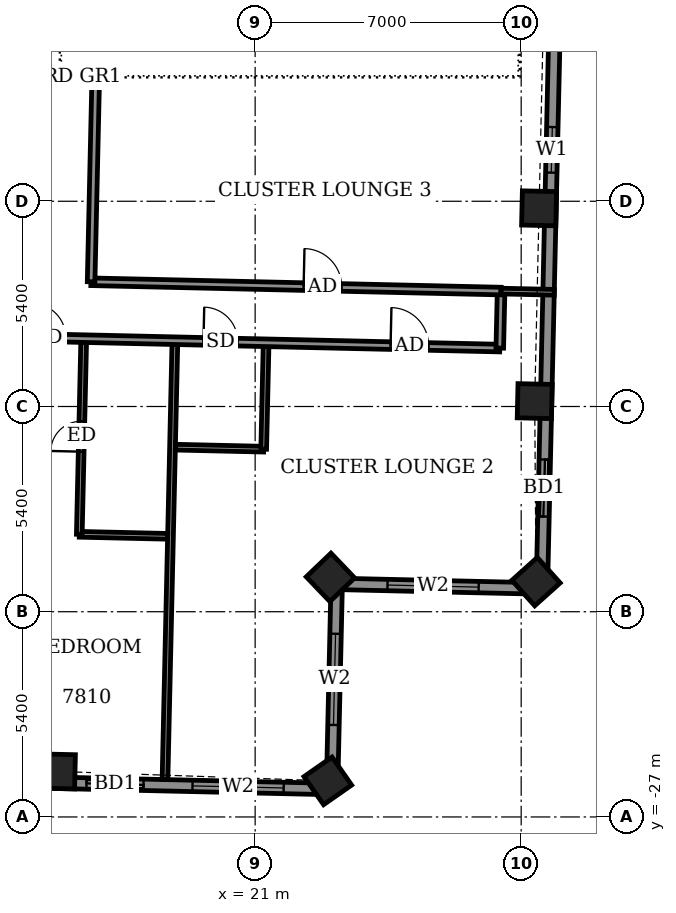
"""IFC4 building model, lengths in metres.
Left out: names, types, materials, properties, quantities, classifications, styles, units other than length and angle.
Written with IfcOpenShell. Run it as: python <this file> out.ifc"""

import sys

from ifc_helpers import new_model, si_unit, direction, frame, frame_2d, origin, origin_2d, place, context, subcontext, project, spatial, rectangle, extrude, element, fill, save


model = new_model("IFC4")
c1 = context("Model", 3, precision=1e-05, world=origin(), true_north=direction((0.0, 1.0)))
c2 = subcontext(c1, "Body", "Model", "MODEL_VIEW")
j1 = project(units=[si_unit("LENGTHUNIT", "METRE"), si_unit("PLANEANGLEUNIT", "RADIAN")], contexts=[c1])
p1 = place(None, origin())
s1 = spatial("IfcSite", under=j1, at=p1, CompositionType="ELEMENT")
p2 = place(p1, origin())
s2 = spatial("IfcBuilding", under=s1, at=p2, CompositionType="ELEMENT")
p3 = place(p2, frame((0.0, 0.0, 306.1)))
s3 = spatial("IfcBuildingStorey", under=s2, at=p3, CompositionType="ELEMENT", Elevation=306.1)
for number, where, z_axis, x_axis in (
    (1, (15.81, -25.802, -0.55), (0.0, 0.0, 1.0), (1.0, -0.023, 0.0)),
    (2, (22.912, -26.05, -0.55), (0.0, 0.0, 1.0), (0.82, 0.572, 0.0)),
    (3, (22.981, -20.696, -0.55), (0.0, 0.0, 1.0), (0.723, 0.691, 0.0)),
    (4, (28.39, -20.808, -0.55), (0.0, 0.0, 1.0), (0.744, 0.668, 0.0)),
    (5, (28.356, -16.059, -0.55), (0.0, 0.0, 1.0), (0.023, 1.0, 0.0)),
    (6, (28.471, -10.986, -0.55), (0.0, 0.0, 1.0), (0.023, 1.0, 0.0)),
):
    element("IfcColumn", number, at=place(p3, frame(where, z_axis=z_axis, x_axis=x_axis)), inside=s3, PredefinedType="COLUMN", context=c2, shape_type="SweptSolid", body=[
        extrude(rectangle(XDim=0.9, YDim=0.9, at=origin_2d()), origin(), (0.0, 0.0, 1.0), 3.6),
    ])
p4 = place(p3, frame((28.544, -20.99, 0.0), z_axis=(0.0, 0.0, 1.0), x_axis=(0.022676396018, 0.999742857471, 0.0)))
e7 = element("IfcWall", 7, at=p4, inside=s3, PredefinedType="SOLIDWALL", context=c2, shape_type="SweptSolid", body=[
    extrude(rectangle(XDim=15.525, YDim=0.3, at=frame_2d((7.762, 0.0))), origin(), (0.0, 0.0, 1.0), 2.55),
])
p5 = place(p4, frame((1.895, 0.0, 0.0)))
e8 = element("IfcOpeningElement", 8, at=p5, cuts=e7, PredefinedType="OPENING", context=c2, shape_type="SweptSolid", body=[
    extrude(rectangle(XDim=1.5, YDim=2.4, at=frame_2d((0.75, 1.2))), frame((0.0, 0.16, 0.0), z_axis=(0.0, -1.0, 0.0), x_axis=(1.0, 0.0, 0.0)), (0.0, 0.0, 1.0), 0.32),
])
p6 = place(p4, frame((10.946, 0.0, 0.9)))
e9 = element("IfcOpeningElement", 9, at=p6, cuts=e7, PredefinedType="OPENING", context=c2, shape_type="SweptSolid", body=[
    extrude(rectangle(XDim=1.2, YDim=1.5, at=frame_2d((0.6, 0.75))), frame((0.0, 0.16, 0.0), z_axis=(0.0, -1.0, 0.0), x_axis=(1.0, 0.0, 0.0)), (0.0, 0.0, 1.0), 0.32),
])
p7 = place(p3, frame((-28.264, -25.102, 0.0), z_axis=(0.0, 0.0, 1.0), x_axis=(0.999742520573, -0.022691244094, 0.0)))
e10 = element("IfcWall", 10, at=p7, inside=s3, PredefinedType="SOLIDWALL", context=c2, shape_type="SweptSolid", body=[
    extrude(rectangle(XDim=51.3, YDim=0.3, at=frame_2d((25.65, 0.0))), origin(), (0.0, 0.0, 1.0), 2.5),
])
p8 = place(p7, frame((1.654, 0.0, 0.0)))
e11 = element("IfcOpeningElement", 11, at=p8, cuts=e10, PredefinedType="OPENING", context=c2, shape_type="SweptSolid", body=[
    extrude(rectangle(XDim=1.5, YDim=2.4, at=frame_2d((0.75, 1.2))), frame((0.0, 0.16, 0.0), z_axis=(0.0, -1.0, 0.0), x_axis=(1.0, 0.0, 0.0)), (0.0, 0.0, 1.0), 0.32),
])
p9 = place(p7, frame((4.936, 0.0, 0.0)))
e12 = element("IfcOpeningElement", 12, at=p9, cuts=e10, PredefinedType="OPENING", context=c2, shape_type="SweptSolid", body=[
    extrude(rectangle(XDim=1.5, YDim=2.4, at=frame_2d((0.75, 1.2))), frame((0.0, 0.16, 0.0), z_axis=(0.0, -1.0, 0.0), x_axis=(1.0, 0.0, 0.0)), (0.0, 0.0, 1.0), 0.32),
])
p10 = place(p7, frame((9.975, 0.0, 0.0)))
e13 = element("IfcOpeningElement", 13, at=p10, cuts=e10, PredefinedType="OPENING", context=c2, shape_type="SweptSolid", body=[
    extrude(rectangle(XDim=1.5, YDim=2.4, at=frame_2d((0.75, 1.2))), frame((0.0, 0.16, 0.0), z_axis=(0.0, -1.0, 0.0), x_axis=(1.0, 0.0, 0.0)), (0.0, 0.0, 1.0), 0.32),
])
p11 = place(p7, frame((15.196, 0.0, 0.0)))
e14 = element("IfcOpeningElement", 14, at=p11, cuts=e10, PredefinedType="OPENING", context=c2, shape_type="SweptSolid", body=[
    extrude(rectangle(XDim=1.5, YDim=2.4, at=frame_2d((0.75, 1.2))), frame((0.0, 0.16, 0.0), z_axis=(0.0, -1.0, 0.0), x_axis=(1.0, 0.0, 0.0)), (0.0, 0.0, 1.0), 0.32),
])
p12 = place(p7, frame((18.5, 0.0, 0.0)))
e15 = element("IfcOpeningElement", 15, at=p12, cuts=e10, PredefinedType="OPENING", context=c2, shape_type="SweptSolid", body=[
    extrude(rectangle(XDim=1.5, YDim=2.4, at=frame_2d((0.75, 1.2))), frame((0.0, 0.16, 0.0), z_axis=(0.0, -1.0, 0.0), x_axis=(1.0, 0.0, 0.0)), (0.0, 0.0, 1.0), 0.32),
])
p13 = place(p7, frame((23.157, 0.0, 0.0)))
e16 = element("IfcOpeningElement", 16, at=p13, cuts=e10, PredefinedType="OPENING", context=c2, shape_type="SweptSolid", body=[
    extrude(rectangle(XDim=1.5, YDim=2.4, at=frame_2d((0.75, 1.2))), frame((0.0, 0.16, 0.0), z_axis=(0.0, -1.0, 0.0), x_axis=(1.0, 0.0, 0.0)), (0.0, 0.0, 1.0), 0.32),
])
p14 = place(p7, frame((26.643, 0.0, 0.0)))
e17 = element("IfcOpeningElement", 17, at=p14, cuts=e10, PredefinedType="OPENING", context=c2, shape_type="SweptSolid", body=[
    extrude(rectangle(XDim=1.5, YDim=2.4, at=frame_2d((0.75, 1.2))), frame((0.0, 0.16, 0.0), z_axis=(0.0, -1.0, 0.0), x_axis=(1.0, 0.0, 0.0)), (0.0, 0.0, 1.0), 0.32),
])
p15 = place(p7, frame((31.275, 0.0, 0.0)))
e18 = element("IfcOpeningElement", 18, at=p15, cuts=e10, PredefinedType="OPENING", context=c2, shape_type="SweptSolid", body=[
    extrude(rectangle(XDim=1.5, YDim=2.4, at=frame_2d((0.75, 1.2))), frame((0.0, 0.16, 0.0), z_axis=(0.0, -1.0, 0.0), x_axis=(1.0, 0.0, 0.0)), (0.0, 0.0, 1.0), 0.32),
])
p16 = place(p7, frame((34.578, 0.0, 0.0)))
e19 = element("IfcOpeningElement", 19, at=p16, cuts=e10, PredefinedType="OPENING", context=c2, shape_type="SweptSolid", body=[
    extrude(rectangle(XDim=1.5, YDim=2.4, at=frame_2d((0.75, 1.2))), frame((0.0, 0.16, 0.0), z_axis=(0.0, -1.0, 0.0), x_axis=(1.0, 0.0, 0.0)), (0.0, 0.0, 1.0), 0.32),
])
p17 = place(p7, frame((39.75, 0.0, 0.0)))
e20 = element("IfcOpeningElement", 20, at=p17, cuts=e10, PredefinedType="OPENING", context=c2, shape_type="SweptSolid", body=[
    extrude(rectangle(XDim=1.5, YDim=2.4, at=frame_2d((0.75, 1.2))), frame((0.0, 0.16, 0.0), z_axis=(0.0, -1.0, 0.0), x_axis=(1.0, 0.0, 0.0)), (0.0, 0.0, 1.0), 0.32),
])
p18 = place(p7, frame((44.839, 0.0, 0.0)))
e21 = element("IfcOpeningElement", 21, at=p18, cuts=e10, PredefinedType="OPENING", context=c2, shape_type="SweptSolid", body=[
    extrude(rectangle(XDim=1.5, YDim=2.4, at=frame_2d((0.75, 1.2))), frame((0.0, 0.16, 0.0), z_axis=(0.0, -1.0, 0.0), x_axis=(1.0, 0.0, 0.0)), (0.0, 0.0, 1.0), 0.32),
])
p19 = place(p7, frame((47.628, 0.0, 0.9)))
e22 = element("IfcOpeningElement", 22, at=p19, cuts=e10, PredefinedType="OPENING", context=c2, shape_type="SweptSolid", body=[
    extrude(rectangle(XDim=2.4, YDim=1.5, at=frame_2d((1.2, 0.75))), frame((0.0, 0.16, 0.0), z_axis=(0.0, -1.0, 0.0), x_axis=(1.0, 0.0, 0.0)), (0.0, 0.0, 1.0), 0.32),
])
p20 = place(p3, frame((23.023, -26.266, 0.0), z_axis=(0.0, 0.0, 1.0), x_axis=(0.022784045517, 0.999740409941, 0.0)))
e23 = element("IfcWall", 23, at=p20, inside=s3, PredefinedType="SOLIDWALL", context=c2, shape_type="SweptSolid", body=[
    extrude(rectangle(XDim=5.401, YDim=0.3, at=frame_2d((2.7, 0.0))), origin(), (0.0, 0.0, 1.0), 2.55),
])
p21 = place(p20, frame((1.687, 0.0, 0.9)))
e24 = element("IfcOpeningElement", 24, at=p21, cuts=e23, PredefinedType="OPENING", context=c2, shape_type="SweptSolid", body=[
    extrude(rectangle(XDim=2.4, YDim=1.5, at=frame_2d((1.2, 0.75))), frame((0.0, 0.16, 0.0), z_axis=(0.0, -1.0, 0.0), x_axis=(1.0, 0.0, 0.0)), (0.0, 0.0, 1.0), 0.32),
])
p22 = place(p3, frame((23.146, -20.867, 0.0), z_axis=(0.0, 0.0, 1.0), x_axis=(0.999740292565, -0.022789195272, 0.0)))
e25 = element("IfcWall", 25, at=p22, inside=s3, PredefinedType="SOLIDWALL", context=c2, shape_type="SweptSolid", body=[
    extrude(rectangle(XDim=5.399, YDim=0.3, at=frame_2d((2.7, 0.0))), origin(), (0.0, 0.0, 1.0), 2.55),
])
p23 = place(p22, frame((1.337, 0.0, 0.9)))
e26 = element("IfcOpeningElement", 26, at=p23, cuts=e25, PredefinedType="OPENING", context=c2, shape_type="SweptSolid", body=[
    extrude(rectangle(XDim=2.4, YDim=1.5, at=frame_2d((1.2, 0.75))), frame((0.0, 0.16, 0.0), z_axis=(0.0, -1.0, 0.0), x_axis=(1.0, 0.0, 0.0)), (0.0, 0.0, 1.0), 0.32),
])
p24 = place(p3, frame((18.628, -26.016, 0.0), z_axis=(0.0, 0.0, 1.0), x_axis=(0.022623082162, 0.999744065325, 0.0)))
e27 = element("IfcWall", 27, at=p24, inside=s3, PredefinedType="PARTITIONING", context=c2, shape_type="SweptSolid", body=[
    extrude(rectangle(XDim=11.45, YDim=0.15, at=frame_2d((5.725, 0.0))), origin(), (0.0, 0.0, 1.0), 2.5),
])
p25 = place(p3, frame((16.373, -19.563, 0.0), z_axis=(0.0, 0.0, 1.0), x_axis=(0.999740478815, -0.022781023197, 0.0)))
e28 = element("IfcWall", 28, at=p25, inside=s3, PredefinedType="PARTITIONING", context=c2, shape_type="SweptSolid", body=[
    extrude(rectangle(XDim=2.325, YDim=0.15, at=frame_2d((1.163, 0.0))), origin(), (0.0, 0.0, 1.0), 3.05),
])
p26 = place(p3, frame((16.373, -19.563, 0.0), z_axis=(0.0, 0.0, 1.0), x_axis=(0.022773025649, 0.999740661023, 0.0)))
e29 = element("IfcWall", 29, at=p26, inside=s3, PredefinedType="PARTITIONING", context=c2, shape_type="SweptSolid", body=[
    extrude(rectangle(XDim=5.049, YDim=0.15, at=frame_2d((2.525, 0.0))), origin(), (0.0, 0.0, 1.0), 3.05),
])
p27 = place(p26, frame((2.175, 0.0, 0.0)))
e30 = element("IfcOpeningElement", 30, at=p27, cuts=e29, PredefinedType="OPENING", context=c2, shape_type="SweptSolid", body=[
    extrude(rectangle(XDim=0.8, YDim=2.1, at=frame_2d((0.4, 1.05))), frame((0.0, 0.085, 0.0), z_axis=(0.0, -1.0, 0.0), x_axis=(1.0, 0.0, 0.0)), (0.0, 0.0, 1.0), 0.17),
])
p28 = place(p3, frame((18.901, -17.27, 0.0), z_axis=(0.0, 0.0, 1.0), x_axis=(0.99974031529, -0.022788198363, 0.0)))
e31 = element("IfcWall", 31, at=p28, inside=s3, PredefinedType="PARTITIONING", context=c2, shape_type="SweptSolid", body=[
    extrude(rectangle(XDim=2.325, YDim=0.15, at=frame_2d((1.162, 0.0))), origin(), (0.0, 0.0, 1.0), 3.05),
])
p29 = place(p3, frame((21.225, -17.323, 0.0), z_axis=(0.0, 0.0, 1.0), x_axis=(0.022961663075, 0.999736346258, 0.0)))
e32 = element("IfcWall", 32, at=p29, inside=s3, PredefinedType="PARTITIONING", context=c2, shape_type="SweptSolid", body=[
    extrude(rectangle(XDim=2.701, YDim=0.15, at=frame_2d((1.35, 0.0))), origin(), (0.0, 0.0, 1.0), 3.05),
])
p30 = place(p3, frame((-31.347, -13.329, 0.0), z_axis=(0.0, 0.0, 1.0), x_axis=(0.999742613079, -0.022687168058, 0.0)))
e33 = element("IfcWall", 33, at=p30, inside=s3, PredefinedType="PARTITIONING", context=c2, shape_type="SweptSolid", body=[
    extrude(rectangle(XDim=58.799, YDim=0.2, at=frame_2d((29.399, 0.0))), origin(), (0.0, 0.0, 1.0), 3.05),
])
p31 = place(p30, frame((1.35, 0.0, 0.0)))
e34 = element("IfcOpeningElement", 34, at=p31, cuts=e33, PredefinedType="OPENING", context=c2, shape_type="SweptSolid", body=[
    extrude(rectangle(XDim=1.0, YDim=2.1, at=frame_2d((0.5, 1.05))), frame((0.0, 0.11, 0.0), z_axis=(0.0, -1.0, 0.0), x_axis=(1.0, 0.0, 0.0)), (0.0, 0.0, 1.0), 0.22),
])
p32 = place(p30, frame((5.95, 0.0, 0.0)))
e35 = element("IfcOpeningElement", 35, at=p32, cuts=e33, PredefinedType="OPENING", context=c2, shape_type="SweptSolid", body=[
    extrude(rectangle(XDim=0.9, YDim=2.1, at=frame_2d((0.45, 1.05))), frame((0.0, 0.11, 0.0), z_axis=(0.0, -1.0, 0.0), x_axis=(1.0, 0.0, 0.0)), (0.0, 0.0, 1.0), 0.22),
])
p33 = place(p30, frame((10.575, 0.0, 0.0)))
e36 = element("IfcOpeningElement", 36, at=p33, cuts=e33, PredefinedType="OPENING", context=c2, shape_type="SweptSolid", body=[
    extrude(rectangle(XDim=0.9, YDim=2.1, at=frame_2d((0.45, 1.05))), frame((0.0, 0.11, 0.0), z_axis=(0.0, -1.0, 0.0), x_axis=(1.0, 0.0, 0.0)), (0.0, 0.0, 1.0), 0.22),
])
p34 = place(p30, frame((12.425, 0.0, 0.0)))
e37 = element("IfcOpeningElement", 37, at=p34, cuts=e33, PredefinedType="OPENING", context=c2, shape_type="SweptSolid", body=[
    extrude(rectangle(XDim=0.9, YDim=2.1, at=frame_2d((0.45, 1.05))), frame((0.0, 0.11, 0.0), z_axis=(0.0, -1.0, 0.0), x_axis=(1.0, 0.0, 0.0)), (0.0, 0.0, 1.0), 0.22),
])
p35 = place(p30, frame((19.075, 0.0, 0.0)))
e38 = element("IfcOpeningElement", 38, at=p35, cuts=e33, PredefinedType="OPENING", context=c2, shape_type="SweptSolid", body=[
    extrude(rectangle(XDim=0.9, YDim=2.1, at=frame_2d((0.45, 1.05))), frame((0.0, 0.11, 0.0), z_axis=(0.0, -1.0, 0.0), x_axis=(1.0, 0.0, 0.0)), (0.0, 0.0, 1.0), 0.22),
])
p36 = place(p30, frame((20.95, 0.0, 0.0)))
e39 = element("IfcOpeningElement", 39, at=p36, cuts=e33, PredefinedType="OPENING", context=c2, shape_type="SweptSolid", body=[
    extrude(rectangle(XDim=0.9, YDim=2.1, at=frame_2d((0.45, 1.05))), frame((0.0, 0.11, 0.0), z_axis=(0.0, -1.0, 0.0), x_axis=(1.0, 0.0, 0.0)), (0.0, 0.0, 1.0), 0.22),
])
p37 = place(p30, frame((27.625, 0.0, 0.0)))
e40 = element("IfcOpeningElement", 40, at=p37, cuts=e33, PredefinedType="OPENING", context=c2, shape_type="SweptSolid", body=[
    extrude(rectangle(XDim=0.9, YDim=2.1, at=frame_2d((0.45, 1.05))), frame((0.0, 0.11, 0.0), z_axis=(0.0, -1.0, 0.0), x_axis=(1.0, 0.0, 0.0)), (0.0, 0.0, 1.0), 0.22),
])
p38 = place(p30, frame((29.475, 0.0, 0.0)))
e41 = element("IfcOpeningElement", 41, at=p38, cuts=e33, PredefinedType="OPENING", context=c2, shape_type="SweptSolid", body=[
    extrude(rectangle(XDim=0.9, YDim=2.1, at=frame_2d((0.45, 1.05))), frame((0.0, 0.11, 0.0), z_axis=(0.0, -1.0, 0.0), x_axis=(1.0, 0.0, 0.0)), (0.0, 0.0, 1.0), 0.22),
])
p39 = place(p30, frame((36.125, 0.0, 0.0)))
e42 = element("IfcOpeningElement", 42, at=p39, cuts=e33, PredefinedType="OPENING", context=c2, shape_type="SweptSolid", body=[
    extrude(rectangle(XDim=0.9, YDim=2.1, at=frame_2d((0.45, 1.05))), frame((0.0, 0.11, 0.0), z_axis=(0.0, -1.0, 0.0), x_axis=(1.0, 0.0, 0.0)), (0.0, 0.0, 1.0), 0.22),
])
p40 = place(p30, frame((37.95, 0.0, 0.0)))
e43 = element("IfcOpeningElement", 43, at=p40, cuts=e33, PredefinedType="OPENING", context=c2, shape_type="SweptSolid", body=[
    extrude(rectangle(XDim=0.9, YDim=2.1, at=frame_2d((0.45, 1.05))), frame((0.0, 0.11, 0.0), z_axis=(0.0, -1.0, 0.0), x_axis=(1.0, 0.0, 0.0)), (0.0, 0.0, 1.0), 0.22),
])
p41 = place(p30, frame((44.6, 0.0, 0.0)))
e44 = element("IfcOpeningElement", 44, at=p41, cuts=e33, PredefinedType="OPENING", context=c2, shape_type="SweptSolid", body=[
    extrude(rectangle(XDim=0.9, YDim=2.1, at=frame_2d((0.45, 1.05))), frame((0.0, 0.11, 0.0), z_axis=(0.0, -1.0, 0.0), x_axis=(1.0, 0.0, 0.0)), (0.0, 0.0, 1.0), 0.22),
])
p42 = place(p30, frame((46.475, 0.0, 0.0)))
e45 = element("IfcOpeningElement", 45, at=p42, cuts=e33, PredefinedType="OPENING", context=c2, shape_type="SweptSolid", body=[
    extrude(rectangle(XDim=0.9, YDim=2.1, at=frame_2d((0.45, 1.05))), frame((0.0, 0.11, 0.0), z_axis=(0.0, -1.0, 0.0), x_axis=(1.0, 0.0, 0.0)), (0.0, 0.0, 1.0), 0.22),
])
p43 = place(p30, frame((55.925, 0.0, 0.0)))
e46 = element("IfcOpeningElement", 46, at=p43, cuts=e33, PredefinedType="OPENING", context=c2, shape_type="SweptSolid", body=[
    extrude(rectangle(XDim=1.0, YDim=2.1, at=frame_2d((0.5, 1.05))), frame((0.0, 0.11, 0.0), z_axis=(0.0, -1.0, 0.0), x_axis=(1.0, 0.0, 0.0)), (0.0, 0.0, 1.0), 0.22),
])
p44 = place(p30, frame((51.0, 0.0, 0.0)))
e47 = element("IfcOpeningElement", 47, at=p44, cuts=e33, PredefinedType="OPENING", context=c2, shape_type="SweptSolid", body=[
    extrude(rectangle(XDim=0.9, YDim=2.1, at=frame_2d((0.45, 1.05))), frame((0.0, 0.11, 0.0), z_axis=(0.0, -1.0, 0.0), x_axis=(1.0, 0.0, 0.0)), (0.0, 0.0, 1.0), 0.22),
])
p45 = place(p3, frame((27.437, -14.663, 0.0), z_axis=(0.0, 0.0, 1.0), x_axis=(0.022617910375, 0.999744182344, 0.0)))
e48 = element("IfcWall", 48, at=p45, inside=s3, PredefinedType="PARTITIONING", context=c2, shape_type="SweptSolid", body=[
    extrude(rectangle(XDim=1.5, YDim=0.2, at=frame_2d((0.75, 0.0))), origin(), (0.0, 0.0, 1.0), 3.05),
])
p46 = place(p3, frame((16.679, -12.918, 0.0), z_axis=(0.0, 0.0, 1.0), x_axis=(0.999742162372, -0.022707020428, 0.0)))
e49 = element("IfcWall", 49, at=p46, inside=s3, PredefinedType="PARTITIONING", context=c2, shape_type="SweptSolid", body=[
    extrude(rectangle(XDim=10.795, YDim=0.2, at=frame_2d((5.397, 0.0))), origin(), (0.0, 0.0, 1.0), 3.05),
])
p47 = place(p46, frame((5.598, 0.0, 0.0)))
e50 = element("IfcOpeningElement", 50, at=p47, cuts=e49, PredefinedType="OPENING", context=c2, shape_type="SweptSolid", body=[
    extrude(rectangle(XDim=1.0, YDim=2.1, at=frame_2d((0.5, 1.05))), frame((0.0, 0.11, 0.0), z_axis=(0.0, -1.0, 0.0), x_axis=(1.0, 0.0, 0.0)), (0.0, 0.0, 1.0), 0.22),
])
p48 = place(p3, frame((16.684, -12.919, 0.0), z_axis=(0.0, 0.0, 1.0), x_axis=(0.022667483124, 0.999743059595, 0.0)))
e51 = element("IfcWall", 51, at=p48, inside=s3, PredefinedType="PARTITIONING", context=c2, shape_type="SweptSolid", body=[
    extrude(rectangle(XDim=5.245, YDim=0.2, at=frame_2d((2.623, 0.0))), origin(), (0.0, 0.0, 1.0), 3.05),
])
p49 = place(p3, frame((27.467, -13.163, 0.0), z_axis=(0.0, 0.0, 1.0), x_axis=(0.999740667531, -0.022772739949, 0.0)))
e52 = element("IfcWall", 52, at=p49, inside=s3, PredefinedType="PARTITIONING", context=c2, shape_type="SweptSolid", body=[
    extrude(rectangle(XDim=1.404, YDim=0.15, at=frame_2d((0.702, 0.0))), origin(), (0.0, 0.0, 1.0), 2.55),
])
p50 = place(p5, origin())
e53 = element("IfcDoor", 53, at=p50, inside=s3, OperationType="SLIDING_TO_LEFT", PredefinedType="DOOR", context=c2, shape_type="SweptSolid", body=[
    extrude(rectangle(XDim=1.5, YDim=2.4, at=frame_2d((0.75, 1.2))), frame((0.0, 0.025, 0.0), z_axis=(0.0, -1.0, 0.0), x_axis=(1.0, 0.0, 0.0)), (0.0, 0.0, 1.0), 0.05),
])
fill(e8, e53)
p51 = place(p6, origin())
e54 = element("IfcWindow", 54, at=p51, inside=s3, PartitioningType="SINGLE_PANEL", PredefinedType="WINDOW", context=c2, shape_type="SweptSolid", body=[
    extrude(rectangle(XDim=1.2, YDim=1.5, at=frame_2d((0.6, 0.75))), frame((0.0, 0.03, 0.0), z_axis=(0.0, -1.0, 0.0), x_axis=(1.0, 0.0, 0.0)), (0.0, 0.0, 1.0), 0.06),
])
fill(e9, e54)
p52 = place(p18, origin())
e55 = element("IfcDoor", 55, at=p52, inside=s3, OperationType="SLIDING_TO_LEFT", PredefinedType="DOOR", context=c2, shape_type="SweptSolid", body=[
    extrude(rectangle(XDim=1.5, YDim=2.4, at=frame_2d((0.75, 1.2))), frame((0.0, 0.025, 0.0), z_axis=(0.0, -1.0, 0.0), x_axis=(1.0, 0.0, 0.0)), (0.0, 0.0, 1.0), 0.05),
])
fill(e21, e55)
p53 = place(p19, origin())
e56 = element("IfcWindow", 56, at=p53, inside=s3, PartitioningType="DOUBLE_PANEL_VERTICAL", PredefinedType="WINDOW", context=c2, shape_type="SweptSolid", body=[
    extrude(rectangle(XDim=2.4, YDim=1.5, at=frame_2d((1.2, 0.75))), frame((0.0, 0.03, 0.0), z_axis=(0.0, -1.0, 0.0), x_axis=(1.0, 0.0, 0.0)), (0.0, 0.0, 1.0), 0.06),
])
fill(e22, e56)
p54 = place(p21, origin())
e57 = element("IfcWindow", 57, at=p54, inside=s3, PartitioningType="DOUBLE_PANEL_VERTICAL", PredefinedType="WINDOW", context=c2, shape_type="SweptSolid", body=[
    extrude(rectangle(XDim=2.4, YDim=1.5, at=frame_2d((1.2, 0.75))), frame((0.0, 0.03, 0.0), z_axis=(0.0, -1.0, 0.0), x_axis=(1.0, 0.0, 0.0)), (0.0, 0.0, 1.0), 0.06),
])
fill(e24, e57)
p55 = place(p23, origin())
e58 = element("IfcWindow", 58, at=p55, inside=s3, PartitioningType="DOUBLE_PANEL_VERTICAL", PredefinedType="WINDOW", context=c2, shape_type="SweptSolid", body=[
    extrude(rectangle(XDim=2.4, YDim=1.5, at=frame_2d((1.2, 0.75))), frame((0.0, 0.03, 0.0), z_axis=(0.0, -1.0, 0.0), x_axis=(1.0, 0.0, 0.0)), (0.0, 0.0, 1.0), 0.06),
])
fill(e26, e58)
p56 = place(p42, origin())
e59 = element("IfcDoor", 59, at=p56, inside=s3, OperationType="SINGLE_SWING_RIGHT", PredefinedType="DOOR", context=c2, shape_type="SweptSolid", body=[
    extrude(rectangle(XDim=0.9, YDim=2.1, at=frame_2d((0.45, 1.05))), frame((0.0, 0.025, 0.0), z_axis=(0.0, -1.0, 0.0), x_axis=(1.0, 0.0, 0.0)), (0.0, 0.0, 1.0), 0.05),
])
fill(e45, e59)
p57 = place(p27, origin())
e60 = element("IfcDoor", 60, at=p57, inside=s3, OperationType="SINGLE_SWING_RIGHT", PredefinedType="DOOR", context=c2, shape_type="SweptSolid", body=[
    extrude(rectangle(XDim=0.8, YDim=2.1, at=frame_2d((0.4, 1.05))), frame((0.0, 0.025, 0.0), z_axis=(0.0, -1.0, 0.0), x_axis=(1.0, 0.0, 0.0)), (0.0, 0.0, 1.0), 0.05),
])
fill(e30, e60)
p58 = place(p43, origin())
e61 = element("IfcDoor", 61, at=p58, inside=s3, OperationType="SINGLE_SWING_RIGHT", PredefinedType="DOOR", context=c2, shape_type="SweptSolid", body=[
    extrude(rectangle(XDim=1.0, YDim=2.1, at=frame_2d((0.5, 1.05))), frame((0.0, 0.025, 0.0), z_axis=(0.0, -1.0, 0.0), x_axis=(1.0, 0.0, 0.0)), (0.0, 0.0, 1.0), 0.05),
])
fill(e46, e61)
p59 = place(p44, origin())
e62 = element("IfcDoor", 62, at=p59, inside=s3, OperationType="SINGLE_SWING_RIGHT", PredefinedType="DOOR", context=c2, shape_type="SweptSolid", body=[
    extrude(rectangle(XDim=0.9, YDim=2.1, at=frame_2d((0.45, 1.05))), frame((0.0, 0.025, 0.0), z_axis=(0.0, -1.0, 0.0), x_axis=(1.0, 0.0, 0.0)), (0.0, 0.0, 1.0), 0.05),
])
fill(e47, e62)
p60 = place(p47, origin())
e63 = element("IfcDoor", 63, at=p60, inside=s3, OperationType="SINGLE_SWING_LEFT", PredefinedType="DOOR", context=c2, shape_type="SweptSolid", body=[
    extrude(rectangle(XDim=1.0, YDim=2.1, at=frame_2d((0.5, 1.05))), frame((0.0, 0.025, 0.0), z_axis=(0.0, -1.0, 0.0), x_axis=(1.0, 0.0, 0.0)), (0.0, 0.0, 1.0), 0.05),
])
fill(e50, e63)
save(model, sys.argv[1])
